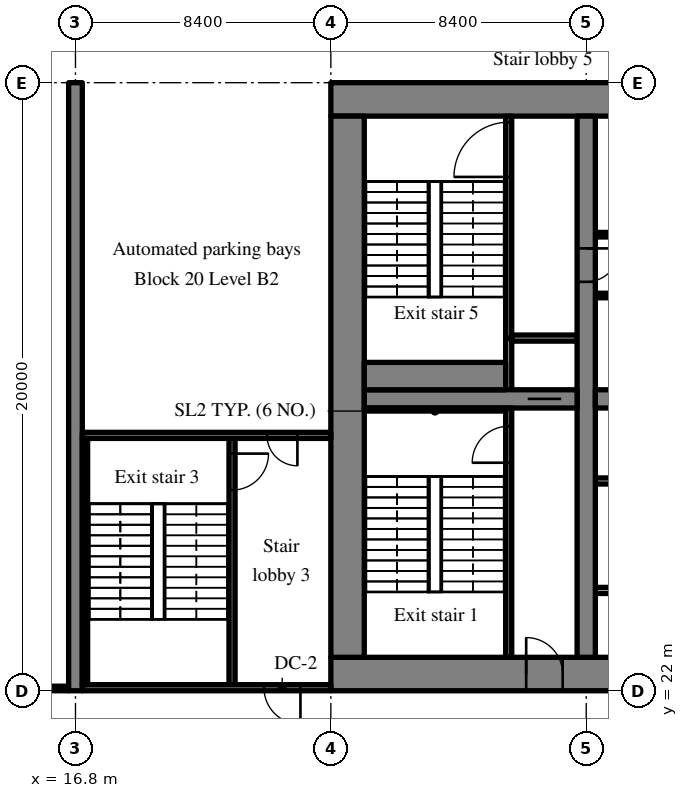
"""IFC4 building model, lengths in metres.
Left out: names, types, materials, properties, quantities, classifications, styles, units other than length and angle.
Written with IfcOpenShell. Run it as: python <this file> out.ifc"""

import sys

from ifc_helpers import new_model, si_unit, direction, frame, frame_2d, origin, place, context, subcontext, project, spatial, rectangle, extrude, source, transform, mapped, element, fill, save


model = new_model("IFC4")
c1 = context("Model", 3, precision=1e-05, world=origin(), true_north=direction((0.0, 1.0)))
c2 = subcontext(c1, "Body", "Model", "MODEL_VIEW")
j1 = project(units=[si_unit("LENGTHUNIT", "METRE"), si_unit("PLANEANGLEUNIT", "RADIAN")], contexts=[c1])
p1 = place(None, origin())
s1 = spatial("IfcSite", under=j1, at=p1, CompositionType="ELEMENT")
p2 = place(p1, origin())
s2 = spatial("IfcBuilding", under=s1, at=p2, CompositionType="ELEMENT")
p3 = place(p2, frame((0.0, 0.0, -9.0)))
s3 = spatial("IfcBuildingStorey", under=s2, at=p3, CompositionType="ELEMENT", Elevation=-9.0)
m1 = source(origin(), c2, "Body", "SweptSolid", [
    extrude(rectangle(XDim=50.4, YDim=1.1, at=frame_2d((25.2, 0.0))), origin(), (0.0, 0.0, 1.0), 4.22),
])
p4 = place(p3, frame((25.2, 22.55, 0.0), z_axis=(0.0, 0.0, 1.0), x_axis=(1.0, 0.0, 0.0)))
e1 = element("IfcWall", 1, at=p4, inside=s3, PredefinedType="SHEAR", context=c2, shape_type="MappedRepresentation", body=[
    mapped(m1, transform((0.0, 0.0, 0.0), scale=1.0)),
])
m2 = source(origin(), c2, "Body", "SweptSolid", [
    extrude(rectangle(XDim=1.8, YDim=2.1, at=frame_2d((0.9, 1.05))), frame((0.0, 0.56, 0.0), z_axis=(0.0, -1.0, 0.0), x_axis=(1.0, 0.0, 0.0)), (0.0, 0.0, 1.0), 1.12),
])
p5 = place(p4, frame((15.9, 0.0, 0.0)))
e2 = element("IfcOpeningElement", 2, at=p5, cuts=e1, PredefinedType="OPENING", context=c2, shape_type="MappedRepresentation", body=[
    mapped(m2, transform((0.0, 0.0, 0.0), scale=1.0)),
])
m3 = source(origin(), c2, "Body", "SweptSolid", [
    extrude(rectangle(XDim=1.2, YDim=2.1, at=frame_2d((0.6, 1.05))), frame((0.0, 0.56, 0.0), z_axis=(0.0, -1.0, 0.0), x_axis=(1.0, 0.0, 0.0)), (0.0, 0.0, 1.0), 1.12),
])
p6 = place(p4, frame((27.0, 0.0, 0.0)))
e3 = element("IfcOpeningElement", 3, at=p6, cuts=e1, PredefinedType="OPENING", context=c2, shape_type="MappedRepresentation", body=[
    mapped(m3, transform((0.0, 0.0, 0.0), scale=1.0)),
])
m4 = source(origin(), c2, "Body", "SweptSolid", [
    extrude(rectangle(XDim=0.9, YDim=2.1, at=frame_2d((0.45, 1.05))), frame((0.0, 0.56, 0.0), z_axis=(0.0, -1.0, 0.0), x_axis=(1.0, 0.0, 0.0)), (0.0, 0.0, 1.0), 1.12),
])
p7 = place(p4, frame((33.75, 0.0, 0.0)))
e4 = element("IfcOpeningElement", 4, at=p7, cuts=e1, PredefinedType="OPENING", context=c2, shape_type="MappedRepresentation", body=[
    mapped(m4, transform((0.0, 0.0, 0.0), scale=1.0)),
])
p8 = place(p4, frame((30.75, 0.0, 0.0)))
e5 = element("IfcOpeningElement", 5, at=p8, cuts=e1, PredefinedType="OPENING", context=c2, shape_type="MappedRepresentation", body=[
    mapped(m4, transform((0.0, 0.0, 0.0), scale=1.0)),
])
p9 = place(p4, frame((38.25, 0.0, 0.0)))
e6 = element("IfcOpeningElement", 6, at=p9, cuts=e1, PredefinedType="OPENING", context=c2, shape_type="MappedRepresentation", body=[
    mapped(m4, transform((0.0, 0.0, 0.0), scale=1.0)),
])
p10 = place(p4, frame((6.425, 0.0, 0.0)))
e7 = element("IfcOpeningElement", 7, at=p10, cuts=e1, PredefinedType="OPENING", context=c2, shape_type="MappedRepresentation", body=[
    mapped(m3, transform((0.0, 0.0, 0.0), scale=1.0)),
])
p11 = place(p4, frame((47.675, 0.0, 0.0)))
e8 = element("IfcOpeningElement", 8, at=p11, cuts=e1, PredefinedType="OPENING", context=c2, shape_type="MappedRepresentation", body=[
    mapped(m3, transform((0.0, 0.0, 0.0), scale=1.0)),
])
p12 = place(p3, frame((25.2, 41.45, 0.0), z_axis=(0.0, 0.0, 1.0), x_axis=(1.0, 0.0, 0.0)))
e9 = element("IfcWall", 9, at=p12, inside=s3, PredefinedType="SHEAR", context=c2, shape_type="MappedRepresentation", body=[
    mapped(m1, transform((0.0, 0.0, 0.0), scale=1.0)),
])
m5 = source(origin(), c2, "Body", "SweptSolid", [
    extrude(rectangle(XDim=17.8, YDim=1.1, at=frame_2d((8.9, 0.0))), origin(), (0.0, 0.0, 1.0), 4.22),
])
p13 = place(p3, frame((25.75, 23.1, 0.0), z_axis=(0.0, 0.0, 1.0), x_axis=(0.0, 1.0, 0.0)))
e10 = element("IfcWall", 10, at=p13, inside=s3, PredefinedType="SHEAR", context=c2, shape_type="MappedRepresentation", body=[
    mapped(m5, transform((0.0, 0.0, 0.0), scale=1.0)),
])
m6 = source(origin(), c2, "Body", "SweptSolid", [
    extrude(rectangle(XDim=17.8, YDim=0.6, at=frame_2d((8.9, 0.0))), origin(), (0.0, 0.0, 1.0), 4.22),
])
p14 = place(p3, frame((33.6, 23.1, 0.0), z_axis=(0.0, 0.0, 1.0), x_axis=(0.0, 1.0, 0.0)))
e11 = element("IfcWall", 11, at=p14, inside=s3, PredefinedType="SHEAR", context=c2, shape_type="MappedRepresentation", body=[
    mapped(m6, transform((0.0, 0.0, 0.0), scale=1.0)),
])
m7 = source(origin(), c2, "Body", "SweptSolid", [
    extrude(rectangle(XDim=1.1, YDim=2.1, at=frame_2d((0.55, 1.05))), frame((0.0, 0.31, 0.0), z_axis=(0.0, -1.0, 0.0), x_axis=(1.0, 0.0, 0.0)), (0.0, 0.0, 1.0), 0.62),
])
p15 = place(p14, frame((12.35, 0.0, 0.0)))
e12 = element("IfcOpeningElement", 12, at=p15, cuts=e11, PredefinedType="OPENING", context=c2, shape_type="MappedRepresentation", body=[
    mapped(m7, transform((0.0, 0.0, 0.0), scale=1.0)),
])
m8 = source(origin(), c2, "Body", "SweptSolid", [
    extrude(rectangle(XDim=7.0, YDim=0.6, at=frame_2d((3.5, 0.0))), origin(), (0.0, 0.0, 1.0), 4.22),
])
p16 = place(p3, frame((26.3, 31.6, 0.0), z_axis=(0.0, 0.0, 1.0), x_axis=(1.0, 0.0, 0.0)))
e13 = element("IfcWall", 13, at=p16, inside=s3, PredefinedType="SHEAR", context=c2, shape_type="MappedRepresentation", body=[
    mapped(m8, transform((0.0, 0.0, 0.0), scale=1.0)),
])
p17 = place(p16, frame((5.375, 0.0, 0.0)))
e14 = element("IfcOpeningElement", 14, at=p17, cuts=e13, PredefinedType="OPENING", context=c2, shape_type="MappedRepresentation", body=[
    mapped(m7, transform((0.0, 0.0, 0.0), scale=1.0)),
])
m9 = source(origin(), c2, "Body", "SweptSolid", [
    extrude(rectangle(XDim=16.2, YDim=0.6, at=frame_2d((8.1, 0.0))), origin(), (0.0, 0.0, 1.0), 4.22),
])
p18 = place(p3, frame((33.9, 31.6, 0.0), z_axis=(0.0, 0.0, 1.0), x_axis=(1.0, 0.0, 0.0)))
e15 = element("IfcWall", 15, at=p18, inside=s3, PredefinedType="SHEAR", context=c2, shape_type="MappedRepresentation", body=[
    mapped(m9, transform((0.0, 0.0, 0.0), scale=1.0)),
])
m10 = source(origin(), c2, "Body", "SweptSolid", [
    extrude(rectangle(XDim=1.0, YDim=2.1, at=frame_2d((0.5, 1.05))), frame((0.0, 0.31, 0.0), z_axis=(0.0, -1.0, 0.0), x_axis=(1.0, 0.0, 0.0)), (0.0, 0.0, 1.0), 0.62),
])
p19 = place(p18, frame((14.65, 0.0, 0.0)))
e16 = element("IfcOpeningElement", 16, at=p19, cuts=e15, PredefinedType="OPENING", context=c2, shape_type="MappedRepresentation", body=[
    mapped(m10, transform((0.0, 0.0, 0.0), scale=1.0)),
])
m11 = source(origin(), c2, "Body", "SweptSolid", [
    extrude(rectangle(XDim=20.0, YDim=0.45, at=frame_2d((10.0, 0.0))), origin(), (0.0, 0.0, 1.0), 4.22),
])
p20 = place(p3, frame((16.8, 22.0, 0.0), z_axis=(0.0, 0.0, 1.0), x_axis=(0.0, 1.0, 0.0)))
e17 = element("IfcWall", 17, at=p20, inside=s3, PredefinedType="SHEAR", context=c2, shape_type="MappedRepresentation", body=[
    mapped(m11, transform((0.0, 0.0, 0.0), scale=1.0)),
])
m12 = source(origin(), c2, "Body", "SweptSolid", [
    extrude(rectangle(XDim=6.0, YDim=0.2, at=frame_2d((3.0, 0.0))), origin(), (0.0, 0.0, 1.0), 4.22),
])
p21 = place(p3, frame((33.9, 25.3, 0.0), z_axis=(0.0, 0.0, 1.0), x_axis=(1.0, 0.0, 0.0)))
e18 = element("IfcWall", 18, at=p21, inside=s3, PredefinedType="SOLIDWALL", context=c2, shape_type="MappedRepresentation", body=[
    mapped(m12, transform((0.0, 0.0, 0.0), scale=1.0)),
])
m13 = source(origin(), c2, "Body", "SweptSolid", [
    extrude(rectangle(XDim=1.1, YDim=2.1, at=frame_2d((0.55, 1.05))), frame((0.0, 0.11, 0.0), z_axis=(0.0, -1.0, 0.0), x_axis=(1.0, 0.0, 0.0)), (0.0, 0.0, 1.0), 0.22),
])
p22 = place(p21, frame((0.95, 0.0, 0.0)))
e19 = element("IfcOpeningElement", 19, at=p22, cuts=e18, PredefinedType="OPENING", context=c2, shape_type="MappedRepresentation", body=[
    mapped(m13, transform((0.0, 0.0, 0.0), scale=1.0)),
])
p23 = place(p21, frame((3.95, 0.0, 0.0)))
e20 = element("IfcOpeningElement", 20, at=p23, cuts=e18, PredefinedType="OPENING", context=c2, shape_type="MappedRepresentation", body=[
    mapped(m13, transform((0.0, 0.0, 0.0), scale=1.0)),
])
m14 = source(origin(), c2, "Body", "SweptSolid", [
    extrude(rectangle(XDim=12.0, YDim=0.2, at=frame_2d((6.0, 0.0))), origin(), (0.0, 0.0, 1.0), 4.22),
])
p24 = place(p3, frame((33.9, 28.9, 0.0), z_axis=(0.0, 0.0, 1.0), x_axis=(1.0, 0.0, 0.0)))
e21 = element("IfcWall", 21, at=p24, inside=s3, PredefinedType="SOLIDWALL", context=c2, shape_type="MappedRepresentation", body=[
    mapped(m14, transform((0.0, 0.0, 0.0), scale=1.0)),
])
p25 = place(p24, frame((6.95, 0.0, 0.0)))
e22 = element("IfcOpeningElement", 22, at=p25, cuts=e21, PredefinedType="OPENING", context=c2, shape_type="MappedRepresentation", body=[
    mapped(m13, transform((0.0, 0.0, 0.0), scale=1.0)),
])
p26 = place(p24, frame((9.95, 0.0, 0.0)))
e23 = element("IfcOpeningElement", 23, at=p26, cuts=e21, PredefinedType="OPENING", context=c2, shape_type="MappedRepresentation", body=[
    mapped(m13, transform((0.0, 0.0, 0.0), scale=1.0)),
])
m15 = source(origin(), c2, "Body", "SweptSolid", [
    extrude(rectangle(XDim=0.9, YDim=2.1, at=frame_2d((0.45, 1.05))), frame((0.0, 0.11, 0.0), z_axis=(0.0, -1.0, 0.0), x_axis=(1.0, 0.0, 0.0)), (0.0, 0.0, 1.0), 0.22),
])
p27 = place(p24, frame((2.55, 0.0, 0.0)))
e24 = element("IfcOpeningElement", 24, at=p27, cuts=e21, PredefinedType="OPENING", context=c2, shape_type="MappedRepresentation", body=[
    mapped(m15, transform((0.0, 0.0, 0.0), scale=1.0)),
])
m16 = source(origin(), c2, "Body", "SweptSolid", [
    extrude(rectangle(XDim=14.1, YDim=0.15, at=frame_2d((7.05, 0.0))), origin(), (0.0, 0.0, 1.0), 4.22),
])
p28 = place(p3, frame((33.9, 35.0, 0.0), z_axis=(0.0, 0.0, 1.0), x_axis=(1.0, 0.0, 0.0)))
e25 = element("IfcWall", 25, at=p28, inside=s3, PredefinedType="PARTITIONING", context=c2, shape_type="MappedRepresentation", body=[
    mapped(m16, transform((0.0, 0.0, 0.0), scale=1.0)),
])
m17 = source(origin(), c2, "Body", "SweptSolid", [
    extrude(rectangle(XDim=0.9, YDim=2.1, at=frame_2d((0.45, 1.05))), frame((0.0, 0.085, 0.0), z_axis=(0.0, -1.0, 0.0), x_axis=(1.0, 0.0, 0.0)), (0.0, 0.0, 1.0), 0.17),
])
p29 = place(p28, frame((6.562, 0.0, 0.0)))
e26 = element("IfcOpeningElement", 26, at=p29, cuts=e25, PredefinedType="OPENING", context=c2, shape_type="MappedRepresentation", body=[
    mapped(m17, transform((0.0, 0.0, 0.0), scale=1.0)),
])
m18 = source(origin(), c2, "Body", "SweptSolid", [
    extrude(rectangle(XDim=16.2, YDim=0.15, at=frame_2d((8.1, 0.0))), origin(), (0.0, 0.0, 1.0), 4.22),
])
p30 = place(p3, frame((33.9, 37.0, 0.0), z_axis=(0.0, 0.0, 1.0), x_axis=(1.0, 0.0, 0.0)))
e27 = element("IfcWall", 27, at=p30, inside=s3, PredefinedType="PARTITIONING", context=c2, shape_type="MappedRepresentation", body=[
    mapped(m18, transform((0.0, 0.0, 0.0), scale=1.0)),
])
p31 = place(p30, frame((0.765, 0.0, 0.0)))
e28 = element("IfcOpeningElement", 28, at=p31, cuts=e27, PredefinedType="OPENING", context=c2, shape_type="MappedRepresentation", body=[
    mapped(m17, transform((0.0, 0.0, 0.0), scale=1.0)),
])
p32 = place(p30, frame((3.6, 0.0, 0.0)))
e29 = element("IfcOpeningElement", 29, at=p32, cuts=e27, PredefinedType="OPENING", context=c2, shape_type="MappedRepresentation", body=[
    mapped(m17, transform((0.0, 0.0, 0.0), scale=1.0)),
])
p33 = place(p30, frame((9.27, 0.0, 0.0)))
e30 = element("IfcOpeningElement", 30, at=p33, cuts=e27, PredefinedType="OPENING", context=c2, shape_type="MappedRepresentation", body=[
    mapped(m17, transform((0.0, 0.0, 0.0), scale=1.0)),
])
p34 = place(p30, frame((14.535, 0.0, 0.0)))
e31 = element("IfcOpeningElement", 31, at=p34, cuts=e27, PredefinedType="OPENING", context=c2, shape_type="MappedRepresentation", body=[
    mapped(m17, transform((0.0, 0.0, 0.0), scale=1.0)),
])
m19 = source(origin(), c2, "Body", "SweptSolid", [
    extrude(rectangle(XDim=8.2, YDim=0.2, at=frame_2d((4.1, 0.0))), origin(), (0.0, 0.0, 1.0), 4.22),
])
p35 = place(p3, frame((31.05, 23.1, 0.0), z_axis=(0.0, 0.0, 1.0), x_axis=(0.0, 1.0, 0.0)))
e32 = element("IfcWall", 32, at=p35, inside=s3, PredefinedType="SOLIDWALL", context=c2, shape_type="MappedRepresentation", body=[
    mapped(m19, transform((0.0, 0.0, 0.0), scale=1.0)),
])
m20 = source(origin(), c2, "Body", "SweptSolid", [
    extrude(rectangle(XDim=1.2, YDim=2.1, at=frame_2d((0.6, 1.05))), frame((0.0, 0.11, 0.0), z_axis=(0.0, -1.0, 0.0), x_axis=(1.0, 0.0, 0.0)), (0.0, 0.0, 1.0), 0.22),
])
p36 = place(p35, frame((6.4, 0.0, 0.0)))
e33 = element("IfcOpeningElement", 33, at=p36, cuts=e32, PredefinedType="OPENING", context=c2, shape_type="MappedRepresentation", body=[
    mapped(m20, transform((0.0, 0.0, 0.0), scale=1.0)),
])
m21 = source(origin(), c2, "Body", "SweptSolid", [
    extrude(rectangle(XDim=1.7, YDim=0.2, at=frame_2d((0.85, 0.0))), origin(), (0.0, 0.0, 1.0), 4.22),
])
p37 = place(p3, frame((31.05, 31.9, 0.0), z_axis=(0.0, 0.0, 1.0), x_axis=(0.0, 1.0, 0.0)))
e34 = element("IfcWall", 34, at=p37, inside=s3, PredefinedType="SOLIDWALL", context=c2, shape_type="MappedRepresentation", body=[
    mapped(m21, transform((0.0, 0.0, 0.0), scale=1.0)),
])
m22 = source(origin(), c2, "Body", "SweptSolid", [
    extrude(rectangle(XDim=2.15, YDim=0.2, at=frame_2d((1.075, 0.0))), origin(), (0.0, 0.0, 1.0), 4.22),
])
p38 = place(p3, frame((31.15, 33.6, 0.0), z_axis=(0.0, 0.0, 1.0), x_axis=(1.0, 0.0, 0.0)))
e35 = element("IfcWall", 35, at=p38, inside=s3, PredefinedType="SOLIDWALL", context=c2, shape_type="MappedRepresentation", body=[
    mapped(m22, transform((0.0, 0.0, 0.0), scale=1.0)),
])
m23 = source(origin(), c2, "Body", "SweptSolid", [
    extrude(rectangle(XDim=7.3, YDim=0.2, at=frame_2d((3.65, 0.0))), origin(), (0.0, 0.0, 1.0), 4.22),
])
p39 = place(p3, frame((31.05, 33.6, 0.0), z_axis=(0.0, 0.0, 1.0), x_axis=(0.0, 1.0, 0.0)))
e36 = element("IfcWall", 36, at=p39, inside=s3, PredefinedType="SOLIDWALL", context=c2, shape_type="MappedRepresentation", body=[
    mapped(m23, transform((0.0, 0.0, 0.0), scale=1.0)),
])
m24 = source(origin(), c2, "Body", "SweptSolid", [
    extrude(rectangle(XDim=1.8, YDim=2.1, at=frame_2d((0.9, 1.05))), frame((0.0, 0.11, 0.0), z_axis=(0.0, -1.0, 0.0), x_axis=(1.0, 0.0, 0.0)), (0.0, 0.0, 1.0), 0.22),
])
p40 = place(p39, frame((5.3, 0.0, 0.0)))
e37 = element("IfcOpeningElement", 37, at=p40, cuts=e36, PredefinedType="OPENING", context=c2, shape_type="MappedRepresentation", body=[
    mapped(m24, transform((0.0, 0.0, 0.0), scale=1.0)),
])
m25 = source(origin(), c2, "Body", "SweptSolid", [
    extrude(rectangle(XDim=8.3, YDim=0.2, at=frame_2d((4.15, 0.0))), origin(), (0.0, 0.0, 1.0), 4.22),
])
p41 = place(p3, frame((21.95, 22.1, 0.0), z_axis=(0.0, 0.0, 1.0), x_axis=(0.0, 1.0, 0.0)))
e38 = element("IfcWall", 38, at=p41, inside=s3, PredefinedType="SOLIDWALL", context=c2, shape_type="MappedRepresentation", body=[
    mapped(m25, transform((0.0, 0.0, 0.0), scale=1.0)),
])
p42 = place(p41, frame((6.5, 0.0, 0.0)))
e39 = element("IfcOpeningElement", 39, at=p42, cuts=e38, PredefinedType="OPENING", context=c2, shape_type="MappedRepresentation", body=[
    mapped(m20, transform((0.0, 0.0, 0.0), scale=1.0)),
])
m26 = source(origin(), c2, "Body", "SweptSolid", [
    extrude(rectangle(XDim=8.175, YDim=0.2, at=frame_2d((4.087, 0.0))), origin(), (0.0, 0.0, 1.0), 4.22),
])
p43 = place(p3, frame((17.025, 22.1, 0.0), z_axis=(0.0, 0.0, 1.0), x_axis=(1.0, 0.0, 0.0)))
e40 = element("IfcWall", 40, at=p43, inside=s3, PredefinedType="SOLIDWALL", context=c2, shape_type="MappedRepresentation", body=[
    mapped(m26, transform((0.0, 0.0, 0.0), scale=1.0)),
])
p44 = place(p43, frame((5.975, 0.0, 0.0)))
e41 = element("IfcOpeningElement", 41, at=p44, cuts=e40, PredefinedType="OPENING", context=c2, shape_type="MappedRepresentation", body=[
    mapped(m20, transform((0.0, 0.0, 0.0), scale=1.0)),
])
p45 = place(p3, frame((17.025, 30.4, 0.0), z_axis=(0.0, 0.0, 1.0), x_axis=(1.0, 0.0, 0.0)))
e42 = element("IfcWall", 42, at=p45, inside=s3, PredefinedType="SOLIDWALL", context=c2, shape_type="MappedRepresentation", body=[
    mapped(m26, transform((0.0, 0.0, 0.0), scale=1.0)),
])
m27 = source(origin(), c2, "Body", "SweptSolid", [
    extrude(rectangle(XDim=1.0, YDim=2.1, at=frame_2d((0.5, 1.05))), frame((0.0, 0.11, 0.0), z_axis=(0.0, -1.0, 0.0), x_axis=(1.0, 0.0, 0.0)), (0.0, 0.0, 1.0), 0.22),
])
p46 = place(p45, frame((6.075, 0.0, 0.0)))
e43 = element("IfcOpeningElement", 43, at=p46, cuts=e42, PredefinedType="OPENING", context=c2, shape_type="MappedRepresentation", body=[
    mapped(m27, transform((0.0, 0.0, 0.0), scale=1.0)),
])
m28 = source(origin(), c2, "Body", "SweptSolid", [
    extrude(rectangle(XDim=4.65, YDim=0.1, at=frame_2d((2.325, 0.0))), origin(), (0.0, 0.0, 1.0), 4.22),
])
p47 = place(p3, frame((26.3, 31.25, 0.0), z_axis=(0.0, 0.0, 1.0), x_axis=(1.0, 0.0, 0.0)))
e44 = element("IfcWall", 44, at=p47, inside=s3, PredefinedType="SOLIDWALL", context=c2, shape_type="MappedRepresentation", body=[
    mapped(m28, transform((0.0, 0.0, 0.0), scale=1.0)),
])
m29 = source(origin(), c2, "Body", "SweptSolid", [
    extrude(rectangle(XDim=8.1, YDim=0.175, at=frame_2d((4.05, 0.0))), origin(), (0.0, 0.0, 1.0), 4.22),
])
p48 = place(p3, frame((17.112, 22.2, 0.0), z_axis=(0.0, 0.0, 1.0), x_axis=(0.0, 1.0, 0.0)))
e45 = element("IfcWall", 45, at=p48, inside=s3, PredefinedType="SOLIDWALL", context=c2, shape_type="MappedRepresentation", body=[
    mapped(m29, transform((0.0, 0.0, 0.0), scale=1.0)),
])
m30 = source(origin(), c2, "Body", "SweptSolid", [
    extrude(rectangle(XDim=4.65, YDim=0.9, at=frame_2d((2.325, 0.0))), origin(), (0.0, 0.0, 1.0), 4.22),
])
p49 = place(p3, frame((26.3, 32.35, 0.0), z_axis=(0.0, 0.0, 1.0), x_axis=(1.0, 0.0, 0.0)))
e46 = element("IfcWall", 46, at=p49, inside=s3, PredefinedType="SOLIDWALL", context=c2, shape_type="MappedRepresentation", body=[
    mapped(m30, transform((0.0, 0.0, 0.0), scale=1.0)),
])
m31 = source(origin(), c2, "Body", "SweptSolid", [
    extrude(rectangle(XDim=7.95, YDim=0.15, at=frame_2d((3.975, 0.0))), origin(), (0.0, 0.0, 1.0), 4.22),
])
p50 = place(p3, frame((8.625, 22.075, 0.0), z_axis=(0.0, 0.0, 1.0), x_axis=(1.0, 0.0, 0.0)))
e47 = element("IfcWall", 47, at=p50, inside=s3, PredefinedType="PARTITIONING", context=c2, shape_type="MappedRepresentation", body=[
    mapped(m31, transform((0.0, 0.0, 0.0), scale=1.0)),
])
m32 = source(origin(), c2, "Body", "SweptSolid", [
    extrude(rectangle(XDim=1.2, YDim=2.1, at=frame_2d((0.6, 1.05))), frame((0.0, 0.025, 0.0), z_axis=(0.0, -1.0, 0.0), x_axis=(1.0, 0.0, 0.0)), (0.0, 0.0, 1.0), 0.05),
])
p51 = place(p36, origin())
e48 = element("IfcDoor", 48, at=p51, inside=s3, OperationType="SINGLE_SWING_LEFT", PredefinedType="DOOR", context=c2, shape_type="MappedRepresentation", body=[
    mapped(m32, transform((0.0, 0.0, 0.0), scale=1.0)),
])
fill(e33, e48)
m33 = source(origin(), c2, "Body", "SweptSolid", [
    extrude(rectangle(XDim=1.2, YDim=2.1, at=frame_2d((0.6, 1.05))), frame((0.0, 0.325, 0.0), z_axis=(0.0, -1.0, 0.0), x_axis=(1.0, 0.0, 0.0)), (0.0, 0.0, 1.0), 0.05),
])
p52 = place(p10, origin())
e49 = element("IfcDoor", 49, at=p52, inside=s3, OperationType="SINGLE_SWING_LEFT", PredefinedType="DOOR", context=c2, shape_type="MappedRepresentation", body=[
    mapped(m33, transform((0.0, 0.0, 0.0), scale=1.0)),
])
fill(e7, e49)
m34 = source(origin(), c2, "Body", "SweptSolid", [
    extrude(rectangle(XDim=1.1, YDim=2.1, at=frame_2d((0.55, 1.05))), frame((0.0, 0.025, 0.0), z_axis=(0.0, -1.0, 0.0), x_axis=(1.0, 0.0, 0.0)), (0.0, 0.0, 1.0), 0.05),
])
p53 = place(p17, origin())
e50 = element("IfcDoor", 50, at=p53, inside=s3, OperationType="SLIDING_TO_RIGHT", PredefinedType="DOOR", context=c2, shape_type="MappedRepresentation", body=[
    mapped(m34, transform((0.0, 0.0, 0.0), scale=1.0)),
])
fill(e14, e50)
m35 = source(origin(), c2, "Body", "SweptSolid", [
    extrude(rectangle(XDim=1.8, YDim=2.1, at=frame_2d((0.9, 1.05))), frame((0.0, 0.025, 0.0), z_axis=(0.0, -1.0, 0.0), x_axis=(1.0, 0.0, 0.0)), (0.0, 0.0, 1.0), 0.05),
])
p54 = place(p40, origin())
e51 = element("IfcDoor", 51, at=p54, inside=s3, OperationType="SINGLE_SWING_LEFT", PredefinedType="DOOR", context=c2, shape_type="MappedRepresentation", body=[
    mapped(m35, transform((0.0, 0.0, 0.0), scale=1.0)),
])
fill(e37, e51)
p55 = place(p42, origin())
e52 = element("IfcDoor", 52, at=p55, inside=s3, OperationType="SINGLE_SWING_RIGHT", PredefinedType="DOOR", context=c2, shape_type="MappedRepresentation", body=[
    mapped(m32, transform((0.0, 0.0, 0.0), scale=1.0)),
])
fill(e39, e52)
p56 = place(p44, origin())
e53 = element("IfcDoor", 53, at=p56, inside=s3, OperationType="SINGLE_SWING_RIGHT", PredefinedType="DOOR", context=c2, shape_type="MappedRepresentation", body=[
    mapped(m32, transform((0.0, 0.0, 0.0), scale=1.0)),
])
fill(e41, e53)
m36 = source(origin(), c2, "Body", "SweptSolid", [
    extrude(rectangle(XDim=1.0, YDim=2.1, at=frame_2d((0.5, 1.05))), frame((0.0, 0.025, 0.0), z_axis=(0.0, -1.0, 0.0), x_axis=(1.0, 0.0, 0.0)), (0.0, 0.0, 1.0), 0.05),
])
p57 = place(p46, origin())
e54 = element("IfcDoor", 54, at=p57, inside=s3, OperationType="SINGLE_SWING_RIGHT", PredefinedType="DOOR", context=c2, shape_type="MappedRepresentation", body=[
    mapped(m36, transform((0.0, 0.0, 0.0), scale=1.0)),
])
fill(e43, e54)
p58 = place(p15, origin())
e55 = element("IfcDoor", 55, at=p58, inside=s3, OperationType="SINGLE_SWING_RIGHT", PredefinedType="DOOR", context=c2, shape_type="MappedRepresentation", body=[
    mapped(m34, transform((0.0, 0.0, 0.0), scale=1.0)),
])
fill(e12, e55)
save(model, sys.argv[1])
